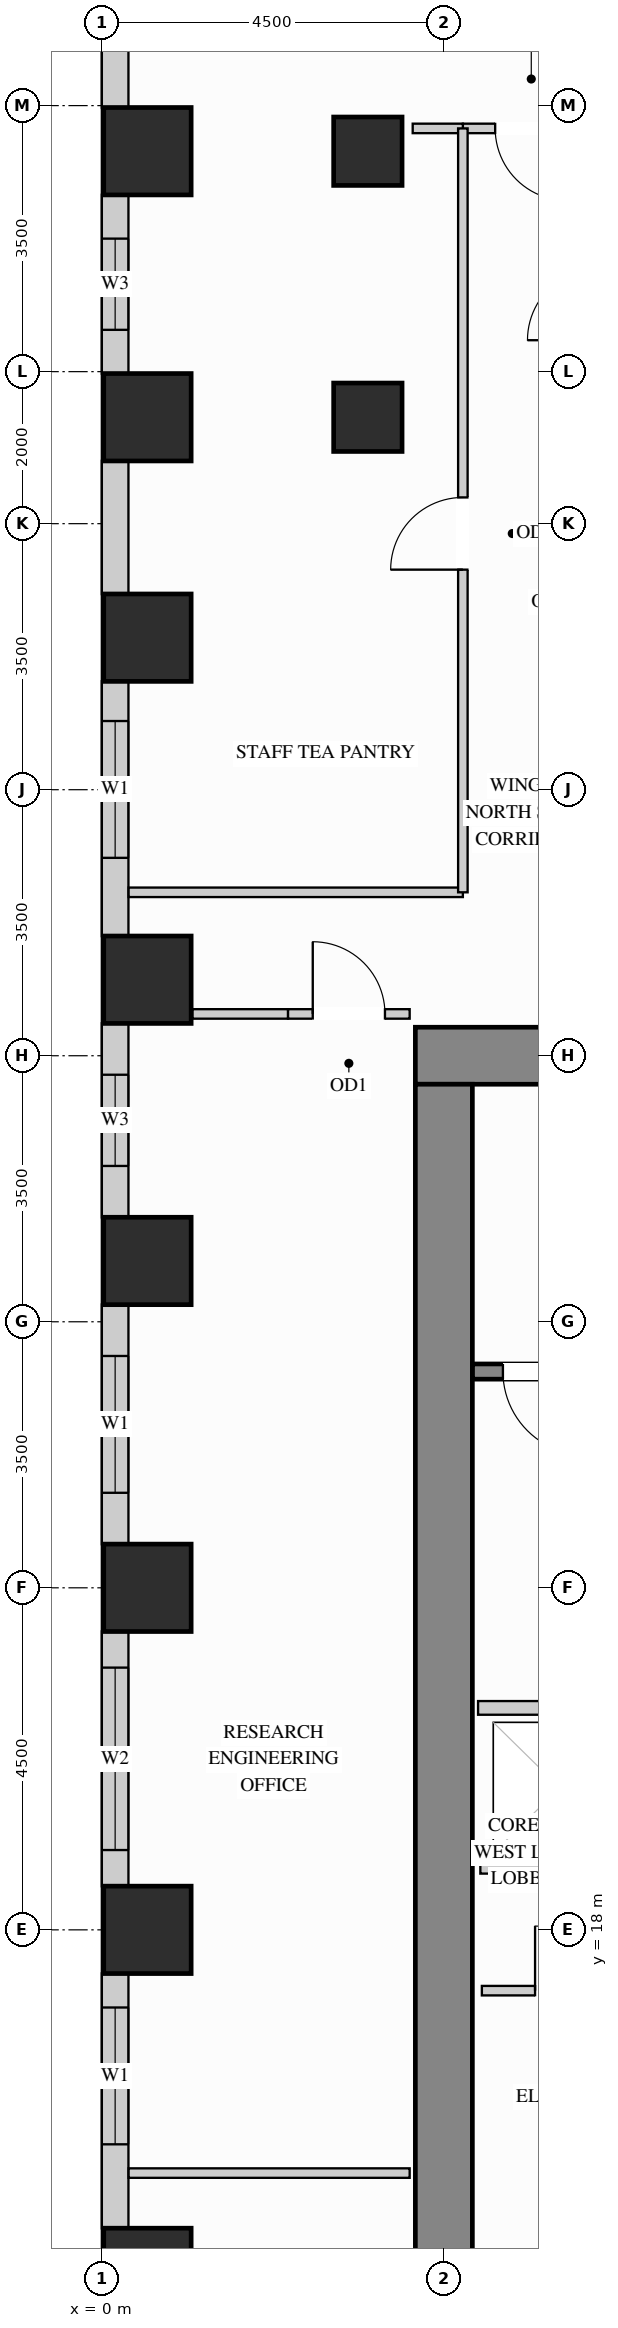
"""IFC4 building model, lengths in metres.
Left out: names, types, materials, properties, quantities, classifications, styles, units other than length and angle.
Written with IfcOpenShell. Run it as: python <this file> out.ifc"""

import sys

from ifc_helpers import new_model, si_unit, direction, frame, frame_2d, origin, origin_2d, place, context, subcontext, project, spatial, rectangle, extrude, source, transform, mapped, element, fill, save


model = new_model("IFC4")
c1 = context("Model", 3, precision=1e-05, world=origin(), true_north=direction((0.0, 1.0)))
c2 = subcontext(c1, "Body", "Model", "MODEL_VIEW")
j1 = project(units=[si_unit("LENGTHUNIT", "METRE"), si_unit("PLANEANGLEUNIT", "RADIAN")], contexts=[c1])
p1 = place(None, origin())
s1 = spatial("IfcSite", under=j1, at=p1, CompositionType="ELEMENT")
p2 = place(p1, origin())
s2 = spatial("IfcBuilding", under=s1, at=p2, CompositionType="ELEMENT")
p3 = place(p2, frame((0.0, 0.0, 120.6)))
s3 = spatial("IfcBuildingStorey", under=s2, at=p3, CompositionType="ELEMENT", Elevation=120.6)
m1 = source(origin(), c2, "Body", "SweptSolid", [
    extrude(rectangle(XDim=0.9, YDim=0.9, at=origin_2d()), origin(), (0.0, 0.0, 1.0), 3.38),
])
for number, where, z_axis, x_axis in (
    (1, (3.5, 37.9, 0.0), (0.0, 0.0, 1.0), (1.0, 0.0, 0.0)),
    (2, (3.5, 41.4, 0.0), (0.0, 0.0, 1.0), (1.0, 0.0, 0.0)),
):
    element("IfcColumn", number, at=place(p3, frame(where, z_axis=z_axis, x_axis=x_axis)), inside=s3, PredefinedType="COLUMN", context=c2, shape_type="MappedRepresentation", body=[
        mapped(m1, transform((0.0, 0.0, 0.0), x_axis=(1.0, 0.0, 0.0), y_axis=(0.0, 1.0, 0.0), z_axis=(0.0, 0.0, 1.0))),
    ])
m2 = source(origin(), c2, "Body", "SweptSolid", [
    extrude(rectangle(XDim=1.15, YDim=1.15, at=origin_2d()), origin(), (0.0, 0.0, 1.0), 3.38),
])
for number, where, z_axis, x_axis in (
    (3, (0.6, 13.5, 0.0), (0.0, 0.0, 1.0), (1.0, 0.0, 0.0)),
    (4, (0.6, 18.0, 0.0), (0.0, 0.0, 1.0), (1.0, 0.0, 0.0)),
    (5, (0.6, 22.5, 0.0), (0.0, 0.0, 1.0), (1.0, 0.0, 0.0)),
    (6, (0.6, 26.8, 0.0), (0.0, 0.0, 1.0), (1.0, 0.0, 0.0)),
    (7, (0.6, 30.5, 0.0), (0.0, 0.0, 1.0), (1.0, 0.0, 0.0)),
    (8, (0.6, 35.0, 0.0), (0.0, 0.0, 1.0), (1.0, 0.0, 0.0)),
    (9, (0.6, 37.9, 0.0), (0.0, 0.0, 1.0), (1.0, 0.0, 0.0)),
    (10, (0.6, 41.4, 0.0), (0.0, 0.0, 1.0), (1.0, 0.0, 0.0)),
):
    element("IfcColumn", number, at=place(p3, frame(where, z_axis=z_axis, x_axis=x_axis)), inside=s3, PredefinedType="COLUMN", context=c2, shape_type="MappedRepresentation", body=[
        mapped(m2, transform((0.0, 0.0, 0.0), x_axis=(1.0, 0.0, 0.0), y_axis=(0.0, 1.0, 0.0), z_axis=(0.0, 0.0, 1.0))),
    ])
m3 = source(origin(), c2, "Body", "SweptSolid", [
    extrude(rectangle(XDim=10.75, YDim=0.75, at=frame_2d((5.375, 0.0))), origin(), (0.0, 0.0, 1.0), 3.38),
])
p4 = place(p3, frame((4.125, 29.5, 0.0), z_axis=(0.0, 0.0, 1.0), x_axis=(1.0, 0.0, 0.0)))
e11 = element("IfcWall", 11, at=p4, inside=s3, PredefinedType="SHEAR", context=c2, shape_type="MappedRepresentation", body=[
    mapped(m3, transform((0.0, 0.0, 0.0), x_axis=(1.0, 0.0, 0.0), y_axis=(0.0, 1.0, 0.0), z_axis=(0.0, 0.0, 1.0))),
])
m4 = source(origin(), c2, "Body", "SweptSolid", [
    extrude(rectangle(XDim=20.25, YDim=0.75, at=frame_2d((10.125, 0.0))), origin(), (0.0, 0.0, 1.0), 3.38),
])
p5 = place(p3, frame((4.5, 8.875, 0.0), z_axis=(0.0, 0.0, 1.0), x_axis=(0.0, 1.0, 0.0)))
e12 = element("IfcWall", 12, at=p5, inside=s3, PredefinedType="SHEAR", context=c2, shape_type="MappedRepresentation", body=[
    mapped(m4, transform((0.0, 0.0, 0.0), x_axis=(1.0, 0.0, 0.0), y_axis=(0.0, 1.0, 0.0), z_axis=(0.0, 0.0, 1.0))),
])
m5 = source(origin(), c2, "Body", "SweptSolid", [
    extrude(rectangle(XDim=1.179, YDim=0.35, at=frame_2d((0.59, 0.0))), origin(), (0.0, 0.0, 1.0), 3.365),
])
p6 = place(p3, frame((0.175, 43.152, 0.0), z_axis=(0.0, 0.0, 1.0), x_axis=(0.0, -1.0, 0.0)))
e13 = element("IfcWall", 13, at=p6, inside=s3, PredefinedType="SOLIDWALL", context=c2, shape_type="MappedRepresentation", body=[
    mapped(m5, transform((0.0, 0.0, 0.0), x_axis=(1.0, 0.0, 0.0), y_axis=(0.0, 1.0, 0.0), z_axis=(0.0, 0.0, 1.0))),
])
p7 = place(p3, frame((0.175, 40.827, 0.0), z_axis=(0.0, 0.0, 1.0), x_axis=(0.0, -1.0, 0.0)))
e14 = element("IfcWall", 14, at=p7, inside=s3, PredefinedType="SOLIDWALL", context=c2, shape_type="SweptSolid", body=[
    extrude(rectangle(XDim=2.354, YDim=0.35, at=frame_2d((1.177, 0.0))), origin(), (0.0, 0.0, 1.0), 3.365),
])
p8 = place(p7, frame((0.577, 0.0, 0.78)))
e15 = element("IfcOpeningElement", 15, at=p8, cuts=e14, PredefinedType="OPENING", context=c2, shape_type="SweptSolid", body=[
    extrude(rectangle(XDim=1.2, YDim=2.1, at=frame_2d((0.6, 1.05))), frame((0.0, 0.185, 0.0), z_axis=(0.0, -1.0, 0.0), x_axis=(1.0, 0.0, 0.0)), (0.0, 0.0, 1.0), 0.37),
])
m6 = source(origin(), c2, "Body", "SweptSolid", [
    extrude(rectangle(XDim=1.754, YDim=0.35, at=frame_2d((0.877, 0.0))), origin(), (0.0, 0.0, 1.0), 3.365),
])
p9 = place(p3, frame((0.175, 37.327, 0.0), z_axis=(0.0, 0.0, 1.0), x_axis=(0.0, -1.0, 0.0)))
e16 = element("IfcWall", 16, at=p9, inside=s3, PredefinedType="SOLIDWALL", context=c2, shape_type="MappedRepresentation", body=[
    mapped(m6, transform((0.0, 0.0, 0.0), x_axis=(1.0, 0.0, 0.0), y_axis=(0.0, 1.0, 0.0), z_axis=(0.0, 0.0, 1.0))),
])
p10 = place(p3, frame((0.175, 34.427, 0.0), z_axis=(0.0, 0.0, 1.0), x_axis=(0.0, -1.0, 0.0)))
e17 = element("IfcWall", 17, at=p10, inside=s3, PredefinedType="SOLIDWALL", context=c2, shape_type="SweptSolid", body=[
    extrude(rectangle(XDim=3.354, YDim=0.35, at=frame_2d((1.677, 0.0))), origin(), (0.0, 0.0, 1.0), 3.365),
])
p11 = place(p10, frame((0.523, 0.0, 0.78)))
e18 = element("IfcOpeningElement", 18, at=p11, cuts=e17, PredefinedType="OPENING", context=c2, shape_type="SweptSolid", body=[
    extrude(rectangle(XDim=1.8, YDim=2.1, at=frame_2d((0.9, 1.05))), frame((0.0, 0.185, 0.0), z_axis=(0.0, -1.0, 0.0), x_axis=(1.0, 0.0, 0.0)), (0.0, 0.0, 1.0), 0.37),
])
p12 = place(p3, frame((0.175, 29.927, 0.0), z_axis=(0.0, 0.0, 1.0), x_axis=(0.0, -1.0, 0.0)))
e19 = element("IfcWall", 19, at=p12, inside=s3, PredefinedType="SOLIDWALL", context=c2, shape_type="SweptSolid", body=[
    extrude(rectangle(XDim=2.554, YDim=0.35, at=frame_2d((1.277, 0.0))), origin(), (0.0, 0.0, 1.0), 3.365),
])
p13 = place(p12, frame((0.677, 0.0, 0.78)))
e20 = element("IfcOpeningElement", 20, at=p13, cuts=e19, PredefinedType="OPENING", context=c2, shape_type="SweptSolid", body=[
    extrude(rectangle(XDim=1.2, YDim=2.1, at=frame_2d((0.6, 1.05))), frame((0.0, 0.185, 0.0), z_axis=(0.0, -1.0, 0.0), x_axis=(1.0, 0.0, 0.0)), (0.0, 0.0, 1.0), 0.37),
])
p14 = place(p3, frame((0.175, 26.227, 0.0), z_axis=(0.0, 0.0, 1.0), x_axis=(0.0, -1.0, 0.0)))
e21 = element("IfcWall", 21, at=p14, inside=s3, PredefinedType="SOLIDWALL", context=c2, shape_type="SweptSolid", body=[
    extrude(rectangle(XDim=3.154, YDim=0.35, at=frame_2d((1.577, 0.0))), origin(), (0.0, 0.0, 1.0), 3.365),
])
p15 = place(p14, frame((0.677, 0.0, 0.78)))
e22 = element("IfcOpeningElement", 22, at=p15, cuts=e21, PredefinedType="OPENING", context=c2, shape_type="SweptSolid", body=[
    extrude(rectangle(XDim=1.8, YDim=2.1, at=frame_2d((0.9, 1.05))), frame((0.0, 0.185, 0.0), z_axis=(0.0, -1.0, 0.0), x_axis=(1.0, 0.0, 0.0)), (0.0, 0.0, 1.0), 0.37),
])
p16 = place(p3, frame((0.175, 21.927, 0.0), z_axis=(0.0, 0.0, 1.0), x_axis=(0.0, -1.0, 0.0)))
e23 = element("IfcWall", 23, at=p16, inside=s3, PredefinedType="SOLIDWALL", context=c2, shape_type="SweptSolid", body=[
    extrude(rectangle(XDim=3.354, YDim=0.35, at=frame_2d((1.677, 0.0))), origin(), (0.0, 0.0, 1.0), 3.365),
])
p17 = place(p16, frame((0.477, 0.0, 0.78)))
e24 = element("IfcOpeningElement", 24, at=p17, cuts=e23, PredefinedType="OPENING", context=c2, shape_type="SweptSolid", body=[
    extrude(rectangle(XDim=2.4, YDim=2.1, at=frame_2d((1.2, 1.05))), frame((0.0, 0.185, 0.0), z_axis=(0.0, -1.0, 0.0), x_axis=(1.0, 0.0, 0.0)), (0.0, 0.0, 1.0), 0.37),
])
p18 = place(p3, frame((0.175, 17.427, 0.0), z_axis=(0.0, 0.0, 1.0), x_axis=(0.0, -1.0, 0.0)))
e25 = element("IfcWall", 25, at=p18, inside=s3, PredefinedType="SOLIDWALL", context=c2, shape_type="SweptSolid", body=[
    extrude(rectangle(XDim=3.354, YDim=0.35, at=frame_2d((1.677, 0.0))), origin(), (0.0, 0.0, 1.0), 3.365),
])
p19 = place(p18, frame((0.448, 0.0, 0.78)))
e26 = element("IfcOpeningElement", 26, at=p19, cuts=e25, PredefinedType="OPENING", context=c2, shape_type="SweptSolid", body=[
    extrude(rectangle(XDim=1.8, YDim=2.1, at=frame_2d((0.9, 1.05))), frame((0.0, 0.185, 0.0), z_axis=(0.0, -1.0, 0.0), x_axis=(1.0, 0.0, 0.0)), (0.0, 0.0, 1.0), 0.37),
])
m7 = source(origin(), c2, "Body", "SweptSolid", [
    extrude(rectangle(XDim=2.2, YDim=0.18, at=frame_2d((1.1, 0.0))), origin(), (0.0, 0.0, 1.0), 3.365),
])
p20 = place(p3, frame((4.95, 20.92, 0.0), z_axis=(0.0, 0.0, 1.0), x_axis=(1.0, 0.0, 0.0)))
e27 = element("IfcWall", 27, at=p20, inside=s3, PredefinedType="PARTITIONING", context=c2, shape_type="MappedRepresentation", body=[
    mapped(m7, transform((0.0, 0.0, 0.0), x_axis=(1.0, 0.0, 0.0), y_axis=(0.0, 1.0, 0.0), z_axis=(0.0, 0.0, 1.0))),
])
p21 = place(p3, frame((5.0, 17.2, 0.0), z_axis=(0.0, 0.0, 1.0), x_axis=(1.0, 0.0, 0.0)))
e28 = element("IfcWall", 28, at=p21, inside=s3, PredefinedType="PARTITIONING", context=c2, shape_type="SweptSolid", body=[
    extrude(rectangle(XDim=2.4, YDim=0.125, at=frame_2d((1.2, 0.0))), origin(), (0.0, 0.0, 1.0), 3.365),
])
p22 = place(p21, frame((0.7, 0.0, 0.0)))
e29 = element("IfcOpeningElement", 29, at=p22, cuts=e28, PredefinedType="OPENING", context=c2, shape_type="SweptSolid", body=[
    extrude(rectangle(XDim=0.85, YDim=2.1, at=frame_2d((0.425, 1.05))), frame((0.0, 0.073, 0.0), z_axis=(0.0, -1.0, 0.0), x_axis=(1.0, 0.0, 0.0)), (0.0, 0.0, 1.0), 0.145),
])
m8 = source(origin(), c2, "Body", "SweptSolid", [
    extrude(rectangle(XDim=4.398, YDim=0.125, at=frame_2d((2.199, 0.0))), origin(), (0.0, 0.0, 1.0), 2.828),
])
p23 = place(p3, frame((0.352, 31.65, 0.0), z_axis=(0.0, 0.0, 1.0), x_axis=(1.0, 0.0, 0.0)))
e30 = element("IfcWall", 30, at=p23, inside=s3, PredefinedType="PARTITIONING", context=c2, shape_type="MappedRepresentation", body=[
    mapped(m8, transform((0.0, 0.0, 0.0), x_axis=(1.0, 0.0, 0.0), y_axis=(0.0, 1.0, 0.0), z_axis=(0.0, 0.0, 1.0))),
])
m9 = source(origin(), c2, "Body", "SweptSolid", [
    extrude(rectangle(XDim=1.26, YDim=0.125, at=frame_2d((0.63, 0.0))), origin(), (0.0, 0.0, 1.0), 3.365),
])
p24 = place(p3, frame((1.19, 30.05, 0.0), z_axis=(0.0, 0.0, 1.0), x_axis=(1.0, 0.0, 0.0)))
e31 = element("IfcWall", 31, at=p24, inside=s3, PredefinedType="PARTITIONING", context=c2, shape_type="MappedRepresentation", body=[
    mapped(m9, transform((0.0, 0.0, 0.0), x_axis=(1.0, 0.0, 0.0), y_axis=(0.0, 1.0, 0.0), z_axis=(0.0, 0.0, 1.0))),
])
p25 = place(p3, frame((2.45, 30.05, 0.0), z_axis=(0.0, 0.0, 1.0), x_axis=(1.0, 0.0, 0.0)))
e32 = element("IfcWall", 32, at=p25, inside=s3, PredefinedType="PARTITIONING", context=c2, shape_type="SweptSolid", body=[
    extrude(rectangle(XDim=1.6, YDim=0.125, at=frame_2d((0.8, 0.0))), origin(), (0.0, 0.0, 1.0), 3.365),
])
p26 = place(p25, frame((0.325, 0.0, 0.0)))
e33 = element("IfcOpeningElement", 33, at=p26, cuts=e32, PredefinedType="OPENING", context=c2, shape_type="SweptSolid", body=[
    extrude(rectangle(XDim=0.95, YDim=2.15, at=frame_2d((0.475, 1.075))), frame((0.0, 0.073, 0.0), z_axis=(0.0, -1.0, 0.0), x_axis=(1.0, 0.0, 0.0)), (0.0, 0.0, 1.0), 0.145),
])
p27 = place(p3, frame((4.75, 41.7, 0.0), z_axis=(0.0, 0.0, 1.0), x_axis=(1.0, 0.0, 0.0)))
e34 = element("IfcWall", 34, at=p27, inside=s3, PredefinedType="PARTITIONING", context=c2, shape_type="SweptSolid", body=[
    extrude(rectangle(XDim=1.8, YDim=0.125, at=frame_2d((0.9, 0.0))), origin(), (0.0, 0.0, 1.0), 3.365),
])
p28 = place(p27, frame((0.425, 0.0, 0.0)))
e35 = element("IfcOpeningElement", 35, at=p28, cuts=e34, PredefinedType="OPENING", context=c2, shape_type="SweptSolid", body=[
    extrude(rectangle(XDim=0.95, YDim=2.15, at=frame_2d((0.475, 1.075))), frame((0.0, 0.073, 0.0), z_axis=(0.0, -1.0, 0.0), x_axis=(1.0, 0.0, 0.0)), (0.0, 0.0, 1.0), 0.145),
])
m10 = source(origin(), c2, "Body", "SweptSolid", [
    extrude(rectangle(XDim=0.66, YDim=0.125, at=frame_2d((0.33, 0.0))), origin(), (0.0, 0.0, 1.0), 3.365),
])
p29 = place(p3, frame((4.09, 41.7, 0.0), z_axis=(0.0, 0.0, 1.0), x_axis=(1.0, 0.0, 0.0)))
e36 = element("IfcWall", 36, at=p29, inside=s3, PredefinedType="PARTITIONING", context=c2, shape_type="MappedRepresentation", body=[
    mapped(m10, transform((0.0, 0.0, 0.0), x_axis=(1.0, 0.0, 0.0), y_axis=(0.0, 1.0, 0.0), z_axis=(0.0, 0.0, 1.0))),
])
p30 = place(p3, frame((4.75, 31.65, 0.0), z_axis=(0.0, 0.0, 1.0), x_axis=(0.0, 1.0, 0.0)))
e37 = element("IfcWall", 37, at=p30, inside=s3, PredefinedType="PARTITIONING", context=c2, shape_type="SweptSolid", body=[
    extrude(rectangle(XDim=10.05, YDim=0.125, at=frame_2d((5.025, 0.0))), origin(), (0.0, 0.0, 1.0), 3.365),
])
p31 = place(p30, frame((4.245, 0.0, 0.0)))
e38 = element("IfcOpeningElement", 38, at=p31, cuts=e37, PredefinedType="OPENING", context=c2, shape_type="SweptSolid", body=[
    extrude(rectangle(XDim=0.95, YDim=2.15, at=frame_2d((0.475, 1.075))), frame((0.0, 0.073, 0.0), z_axis=(0.0, -1.0, 0.0), x_axis=(1.0, 0.0, 0.0)), (0.0, 0.0, 1.0), 0.145),
])
m11 = source(origin(), c2, "Body", "SweptSolid", [
    extrude(rectangle(XDim=3.698, YDim=0.125, at=frame_2d((1.849, 0.0))), origin(), (0.0, 0.0, 1.0), 3.365),
])
p32 = place(p3, frame((0.352, 14.8, 0.0), z_axis=(0.0, 0.0, 1.0), x_axis=(1.0, 0.0, 0.0)))
e39 = element("IfcWall", 39, at=p32, inside=s3, PredefinedType="PARTITIONING", context=c2, shape_type="MappedRepresentation", body=[
    mapped(m11, transform((0.0, 0.0, 0.0), x_axis=(1.0, 0.0, 0.0), y_axis=(0.0, 1.0, 0.0), z_axis=(0.0, 0.0, 1.0))),
])
m12 = source(origin(), c2, "Body", "SweptSolid", [
    extrude(rectangle(XDim=2.09, YDim=0.2, at=frame_2d((1.045, 0.0))), origin(), (0.0, 0.0, 1.0), 3.365),
])
p33 = place(p3, frame((4.98, 18.84, 0.0), z_axis=(0.0, 0.0, 1.0), x_axis=(1.0, 0.0, 0.0)))
e40 = element("IfcWall", 40, at=p33, inside=s3, PredefinedType="PARTITIONING", context=c2, shape_type="MappedRepresentation", body=[
    mapped(m12, transform((0.0, 0.0, 0.0), x_axis=(1.0, 0.0, 0.0), y_axis=(0.0, 1.0, 0.0), z_axis=(0.0, 0.0, 1.0))),
])
p34 = place(p3, frame((4.877, 25.345, 0.0), z_axis=(0.0, 0.0, 1.0), x_axis=(1.0, 0.0, 0.0)))
e41 = element("IfcWall", 41, at=p34, inside=s3, PredefinedType="SHEAR", context=c2, shape_type="SweptSolid", body=[
    extrude(rectangle(XDim=7.528, YDim=0.2, at=frame_2d((3.764, 0.0))), origin(), (0.0, 0.0, 1.0), 3.38),
])
p35 = place(p34, frame((0.4, 0.0, 0.0)))
e42 = element("IfcOpeningElement", 42, at=p35, cuts=e41, PredefinedType="OPENING", context=c2, shape_type="SweptSolid", body=[
    extrude(rectangle(XDim=1.1, YDim=2.15, at=frame_2d((0.55, 1.075))), frame((0.0, 0.11, 0.0), z_axis=(0.0, -1.0, 0.0), x_axis=(1.0, 0.0, 0.0)), (0.0, 0.0, 1.0), 0.22),
])
m13 = source(origin(), c2, "Body", "SweptSolid", [
    extrude(rectangle(XDim=0.95, YDim=2.15, at=frame_2d((0.475, 1.075))), frame((0.0, 0.025, 0.0), z_axis=(0.0, -1.0, 0.0), x_axis=(1.0, 0.0, 0.0)), (0.0, 0.0, 1.0), 0.05),
])
p36 = place(p28, origin())
e43 = element("IfcDoor", 43, at=p36, inside=s3, OperationType="SINGLE_SWING_RIGHT", PredefinedType="DOOR", context=c2, shape_type="MappedRepresentation", body=[
    mapped(m13, transform((0.0, 0.0, 0.0), x_axis=(1.0, 0.0, 0.0), y_axis=(0.0, 1.0, 0.0), z_axis=(0.0, 0.0, 1.0))),
])
fill(e35, e43)
p37 = place(p31, origin())
e44 = element("IfcDoor", 44, at=p37, inside=s3, OperationType="SINGLE_SWING_LEFT", PredefinedType="DOOR", context=c2, shape_type="MappedRepresentation", body=[
    mapped(m13, transform((0.0, 0.0, 0.0), x_axis=(1.0, 0.0, 0.0), y_axis=(0.0, 1.0, 0.0), z_axis=(0.0, 0.0, 1.0))),
])
fill(e38, e44)
p38 = place(p26, origin())
e45 = element("IfcDoor", 45, at=p38, inside=s3, OperationType="SINGLE_SWING_LEFT", PredefinedType="DOOR", context=c2, shape_type="MappedRepresentation", body=[
    mapped(m13, transform((0.0, 0.0, 0.0), x_axis=(1.0, 0.0, 0.0), y_axis=(0.0, 1.0, 0.0), z_axis=(0.0, 0.0, 1.0))),
])
fill(e33, e45)
m14 = source(origin(), c2, "Body", "SweptSolid", [
    extrude(rectangle(XDim=0.85, YDim=2.1, at=frame_2d((0.425, 1.05))), frame((0.0, 0.025, 0.0), z_axis=(0.0, -1.0, 0.0), x_axis=(1.0, 0.0, 0.0)), (0.0, 0.0, 1.0), 0.05),
])
p39 = place(p22, origin())
e46 = element("IfcDoor", 46, at=p39, inside=s3, OperationType="SINGLE_SWING_LEFT", PredefinedType="DOOR", context=c2, shape_type="MappedRepresentation", body=[
    mapped(m14, transform((0.0, 0.0, 0.0), x_axis=(1.0, 0.0, 0.0), y_axis=(0.0, 1.0, 0.0), z_axis=(0.0, 0.0, 1.0))),
])
fill(e29, e46)
m15 = source(origin(), c2, "Body", "SweptSolid", [
    extrude(rectangle(XDim=1.1, YDim=2.15, at=frame_2d((0.55, 1.075))), frame((0.0, 0.025, 0.0), z_axis=(0.0, -1.0, 0.0), x_axis=(1.0, 0.0, 0.0)), (0.0, 0.0, 1.0), 0.05),
])
p40 = place(p35, origin())
e47 = element("IfcDoor", 47, at=p40, inside=s3, OperationType="SINGLE_SWING_RIGHT", PredefinedType="DOOR", context=c2, shape_type="MappedRepresentation", body=[
    mapped(m15, transform((0.0, 0.0, 0.0), x_axis=(1.0, 0.0, 0.0), y_axis=(0.0, 1.0, 0.0), z_axis=(0.0, 0.0, 1.0))),
])
fill(e42, e47)
m16 = source(origin(), c2, "Body", "SweptSolid", [
    extrude(rectangle(XDim=1.8, YDim=2.1, at=frame_2d((0.9, 1.05))), frame((0.0, 0.03, 0.0), z_axis=(0.0, -1.0, 0.0), x_axis=(1.0, 0.0, 0.0)), (0.0, 0.0, 1.0), 0.06),
])
p41 = place(p11, origin())
e48 = element("IfcWindow", 48, at=p41, inside=s3, PartitioningType="SINGLE_PANEL", PredefinedType="WINDOW", context=c2, shape_type="MappedRepresentation", body=[
    mapped(m16, transform((0.0, 0.0, 0.0), x_axis=(1.0, 0.0, 0.0), y_axis=(0.0, 1.0, 0.0), z_axis=(0.0, 0.0, 1.0))),
])
fill(e18, e48)
p42 = place(p15, origin())
e49 = element("IfcWindow", 49, at=p42, inside=s3, PartitioningType="SINGLE_PANEL", PredefinedType="WINDOW", context=c2, shape_type="MappedRepresentation", body=[
    mapped(m16, transform((0.0, 0.0, 0.0), x_axis=(1.0, 0.0, 0.0), y_axis=(0.0, 1.0, 0.0), z_axis=(0.0, 0.0, 1.0))),
])
fill(e22, e49)
p43 = place(p19, origin())
e50 = element("IfcWindow", 50, at=p43, inside=s3, PartitioningType="SINGLE_PANEL", PredefinedType="WINDOW", context=c2, shape_type="MappedRepresentation", body=[
    mapped(m16, transform((0.0, 0.0, 0.0), x_axis=(1.0, 0.0, 0.0), y_axis=(0.0, 1.0, 0.0), z_axis=(0.0, 0.0, 1.0))),
])
fill(e26, e50)
m17 = source(origin(), c2, "Body", "SweptSolid", [
    extrude(rectangle(XDim=2.4, YDim=2.1, at=frame_2d((1.2, 1.05))), frame((0.0, 0.03, 0.0), z_axis=(0.0, -1.0, 0.0), x_axis=(1.0, 0.0, 0.0)), (0.0, 0.0, 1.0), 0.06),
])
p44 = place(p17, origin())
e51 = element("IfcWindow", 51, at=p44, inside=s3, PartitioningType="SINGLE_PANEL", PredefinedType="WINDOW", context=c2, shape_type="MappedRepresentation", body=[
    mapped(m17, transform((0.0, 0.0, 0.0), x_axis=(1.0, 0.0, 0.0), y_axis=(0.0, 1.0, 0.0), z_axis=(0.0, 0.0, 1.0))),
])
fill(e24, e51)
m18 = source(origin(), c2, "Body", "SweptSolid", [
    extrude(rectangle(XDim=1.2, YDim=2.1, at=frame_2d((0.6, 1.05))), frame((0.0, 0.03, 0.0), z_axis=(0.0, -1.0, 0.0), x_axis=(1.0, 0.0, 0.0)), (0.0, 0.0, 1.0), 0.06),
])
p45 = place(p8, origin())
e52 = element("IfcWindow", 52, at=p45, inside=s3, PartitioningType="SINGLE_PANEL", PredefinedType="WINDOW", context=c2, shape_type="MappedRepresentation", body=[
    mapped(m18, transform((0.0, 0.0, 0.0), x_axis=(1.0, 0.0, 0.0), y_axis=(0.0, 1.0, 0.0), z_axis=(0.0, 0.0, 1.0))),
])
fill(e15, e52)
p46 = place(p13, origin())
e53 = element("IfcWindow", 53, at=p46, inside=s3, PartitioningType="SINGLE_PANEL", PredefinedType="WINDOW", context=c2, shape_type="MappedRepresentation", body=[
    mapped(m18, transform((0.0, 0.0, 0.0), x_axis=(1.0, 0.0, 0.0), y_axis=(0.0, 1.0, 0.0), z_axis=(0.0, 0.0, 1.0))),
])
fill(e20, e53)
save(model, sys.argv[1])
